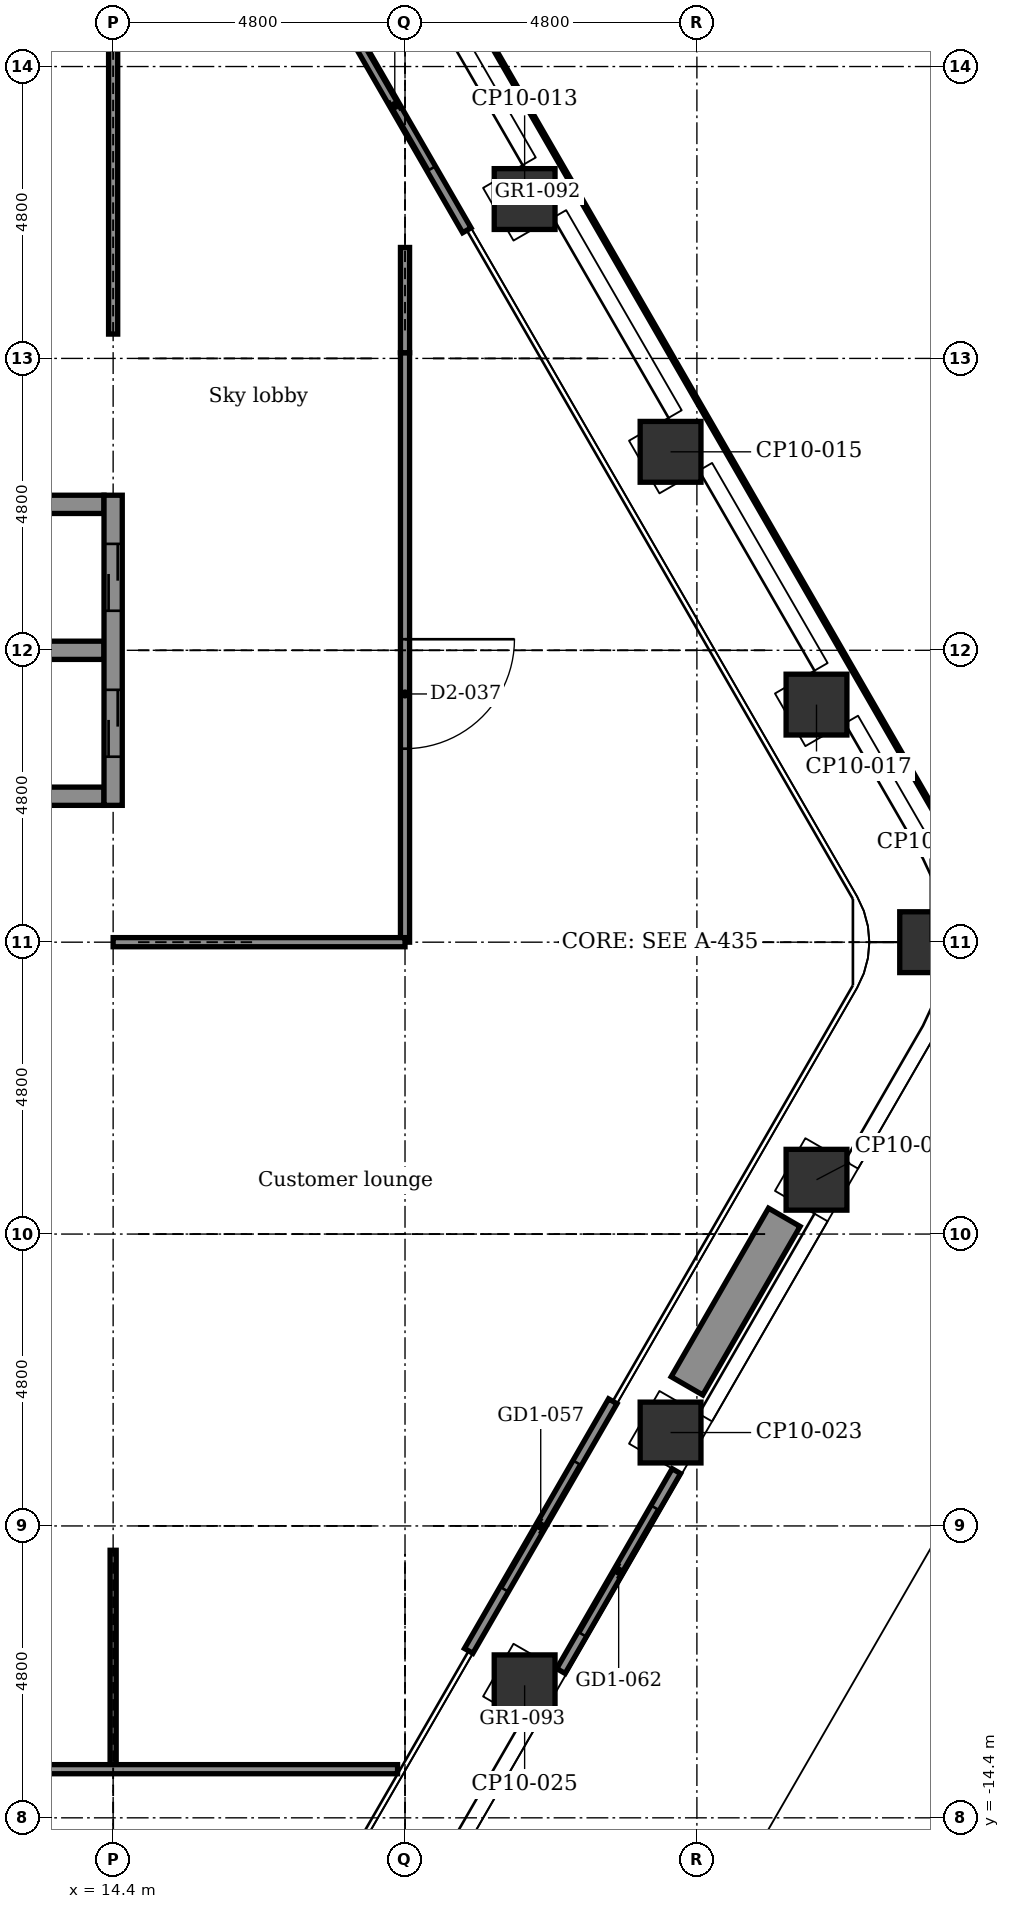
"""IFC4 building model, lengths in metres.
Left out: names, types, materials, properties, quantities, classifications, styles, units other than length and angle.
Written with IfcOpenShell. Run it as: python <this file> out.ifc"""

import sys

from ifc_helpers import new_model, si_unit, direction, frame, frame_2d, origin, origin_2d, place, context, subcontext, project, spatial, rectangle, extrude, element, fill, save


model = new_model("IFC4")
c1 = context("Model", 3, precision=1e-05, world=origin(), true_north=direction((0.0, 1.0)))
c2 = subcontext(c1, "Body", "Model", "MODEL_VIEW")
j1 = project(units=[si_unit("LENGTHUNIT", "METRE"), si_unit("PLANEANGLEUNIT", "RADIAN")], contexts=[c1])
p1 = place(None, origin())
s1 = spatial("IfcSite", under=j1, at=p1, CompositionType="ELEMENT")
p2 = place(p1, origin())
s2 = spatial("IfcBuilding", under=s1, at=p2, CompositionType="ELEMENT")
p3 = place(p2, frame((0.0, 0.0, 133.4)))
s3 = spatial("IfcBuildingStorey", under=s2, at=p3, CompositionType="ELEMENT", Elevation=133.4)
for number, where, z_axis, x_axis in (
    (1, (21.167, 12.221, -0.15), (0.0, 0.0, 1.0), (0.866, 0.5, 0.0)),
    (2, (23.567, 8.064, -0.15), (0.0, 0.0, 1.0), (0.866, 0.5, 0.0)),
    (3, (25.967, 3.907, -0.15), (0.0, 0.0, 1.0), (0.866, 0.5, 0.0)),
    (4, (27.836, 0.0, -0.15), (0.0, 0.0, 1.0), (1.0, 0.0, 0.0)),
    (5, (25.967, -3.907, -0.15), (0.0, 0.0, 1.0), (0.5, 0.866, 0.0)),
    (6, (23.567, -8.064, -0.15), (0.0, 0.0, 1.0), (0.5, 0.866, 0.0)),
    (7, (21.167, -12.221, -0.15), (0.0, 0.0, 1.0), (0.5, 0.866, 0.0)),
):
    element("IfcColumn", number, at=place(p3, frame(where, z_axis=z_axis, x_axis=x_axis)), inside=s3, PredefinedType="COLUMN", context=c2, shape_type="SweptSolid", body=[
        extrude(rectangle(XDim=1.0, YDim=1.0, at=origin_2d()), origin(), (0.0, 0.0, 1.0), 5.4),
    ])
for number, where, z_axis, x_axis in (
    (8, (9.95, 2.4, -0.15), (0.0, 0.0, 1.0), (1.0, 0.0, 0.0)),
    (9, (9.95, 4.8, -0.15), (0.0, 0.0, 1.0), (1.0, 0.0, 0.0)),
    (10, (9.95, 7.2, -0.15), (0.0, 0.0, 1.0), (1.0, 0.0, 0.0)),
):
    element("IfcWall", number, at=place(p3, frame(where, z_axis=z_axis, x_axis=x_axis)), inside=s3, PredefinedType="STANDARD", context=c2, shape_type="SweptSolid", body=[
        extrude(rectangle(XDim=4.3, YDim=0.3, at=frame_2d((2.15, 0.0))), origin(), (0.0, 0.0, 1.0), 4.55),
    ])
p4 = place(p3, frame((14.4, 2.25, -0.15), z_axis=(0.0, 0.0, 1.0), x_axis=(0.0, 1.0, 0.0)))
e11 = element("IfcWall", 11, at=p4, inside=s3, PredefinedType="STANDARD", context=c2, shape_type="SweptSolid", body=[
    extrude(rectangle(XDim=5.1, YDim=0.3, at=frame_2d((2.55, 0.0))), origin(), (0.0, 0.0, 1.0), 4.55),
])
p5 = place(p4, frame((0.8, 0.0, 0.15)))
e12 = element("IfcOpeningElement", 12, at=p5, cuts=e11, PredefinedType="OPENING", context=c2, shape_type="SweptSolid", body=[
    extrude(rectangle(XDim=1.1, YDim=2.1, at=frame_2d((0.55, 1.05))), frame((0.0, 0.16, 0.0), z_axis=(0.0, -1.0, 0.0), x_axis=(1.0, 0.0, 0.0)), (0.0, 0.0, 1.0), 0.32),
])
p6 = place(p4, frame((3.2, 0.0, 0.15)))
e13 = element("IfcOpeningElement", 13, at=p6, cuts=e11, PredefinedType="OPENING", context=c2, shape_type="SweptSolid", body=[
    extrude(rectangle(XDim=1.1, YDim=2.1, at=frame_2d((0.55, 1.05))), frame((0.0, 0.16, 0.0), z_axis=(0.0, -1.0, 0.0), x_axis=(1.0, 0.0, 0.0)), (0.0, 0.0, 1.0), 0.32),
])
p7 = place(p3, frame((17.847, 15.812, 0.0), z_axis=(0.0, 0.0, 1.0), x_axis=(0.5000167099, -0.866015756104, 0.0)))
e14 = element("IfcWall", 14, at=p7, inside=s3, PredefinedType="PARTITIONING", context=c2, shape_type="SweptSolid", body=[
    extrude(rectangle(XDim=4.74, YDim=0.16, at=frame_2d((2.37, 0.0))), origin(), (0.0, 0.0, 1.0), 5.25),
])
p8 = place(p7, frame((1.17, 0.0, 0.0)))
e15 = element("IfcOpeningElement", 15, at=p8, cuts=e14, PredefinedType="OPENING", context=c2, shape_type="SweptSolid", body=[
    extrude(rectangle(XDim=2.4, YDim=2.4, at=frame_2d((1.2, 1.2))), frame((0.0, 0.09, 0.0), z_axis=(0.0, -1.0, 0.0), x_axis=(1.0, 0.0, 0.0)), (0.0, 0.0, 1.0), 0.18),
])
p9 = place(p3, frame((22.617, -7.55, 0.0), z_axis=(0.0, 0.0, 1.0), x_axis=(-0.5000167099, -0.866015756104, 0.0)))
e16 = element("IfcWall", 16, at=p9, inside=s3, PredefinedType="PARTITIONING", context=c2, shape_type="SweptSolid", body=[
    extrude(rectangle(XDim=4.74, YDim=0.16, at=frame_2d((2.37, 0.0))), origin(), (0.0, 0.0, 1.0), 5.25),
])
p10 = place(p9, frame((1.17, 0.0, 0.0)))
e17 = element("IfcOpeningElement", 17, at=p10, cuts=e16, PredefinedType="OPENING", context=c2, shape_type="SweptSolid", body=[
    extrude(rectangle(XDim=2.4, YDim=2.4, at=frame_2d((1.2, 1.2))), frame((0.0, 0.09, 0.0), z_axis=(0.0, -1.0, 0.0), x_axis=(1.0, 0.0, 0.0)), (0.0, 0.0, 1.0), 0.18),
])
p11 = place(p3, frame((25.437, -4.525, 0.0), z_axis=(0.0, 0.0, 1.0), x_axis=(-0.499938187974, -0.866061088033, 0.0)))
e18 = element("IfcWall", 18, at=p11, inside=s3, PredefinedType="USERDEFINED", context=c2, shape_type="SweptSolid", body=[
    extrude(rectangle(XDim=3.2, YDim=0.6, at=frame_2d((1.6, 0.0))), origin(), (0.0, 0.0, 1.0), 0.7),
])
p12 = place(p3, frame((23.662, -8.698, 0.0), z_axis=(0.0, 0.0, 1.0), x_axis=(-0.499971120268, -0.866042076863, 0.0)))
e19 = element("IfcWall", 19, at=p12, inside=s3, PredefinedType="PARTITIONING", context=c2, shape_type="SweptSolid", body=[
    extrude(rectangle(XDim=3.796, YDim=0.16, at=frame_2d((1.898, 0.0))), origin(), (0.0, 0.0, 1.0), 4.25),
])
p13 = place(p12, frame((0.698, 0.0, 0.0)))
e20 = element("IfcOpeningElement", 20, at=p13, cuts=e19, PredefinedType="OPENING", context=c2, shape_type="SweptSolid", body=[
    extrude(rectangle(XDim=2.4, YDim=2.4, at=frame_2d((1.2, 1.2))), frame((0.0, 0.09, 0.0), z_axis=(0.0, -1.0, 0.0), x_axis=(1.0, 0.0, 0.0)), (0.0, 0.0, 1.0), 0.18),
])
p14 = place(p3, frame((19.2, 0.0, 0.0), z_axis=(0.0, 0.0, 1.0), x_axis=(0.0, 1.0, 0.0)))
e21 = element("IfcWall", 21, at=p14, inside=s3, PredefinedType="PARTITIONING", context=c2, shape_type="SweptSolid", body=[
    extrude(rectangle(XDim=9.694, YDim=0.15, at=frame_2d((4.847, 0.0))), origin(), (0.0, 0.0, 1.0), 5.25),
])
p15 = place(p14, frame((3.182, 0.0, 0.0)))
e22 = element("IfcOpeningElement", 22, at=p15, cuts=e21, PredefinedType="OPENING", context=c2, shape_type="SweptSolid", body=[
    extrude(rectangle(XDim=1.8, YDim=2.1, at=frame_2d((0.9, 1.05))), frame((0.0, 0.085, 0.0), z_axis=(0.0, -1.0, 0.0), x_axis=(1.0, 0.0, 0.0)), (0.0, 0.0, 1.0), 0.17),
])
p16 = place(p3, frame((19.2, 9.694, 0.0), z_axis=(0.0, 0.0, 1.0), x_axis=(0.0, 1.0, 0.0)))
e23 = element("IfcWall", 23, at=p16, inside=s3, PredefinedType="PARTITIONING", context=c2, shape_type="SweptSolid", body=[
    extrude(rectangle(XDim=1.731, YDim=0.15, at=frame_2d((0.865, 0.0))), origin(), (0.0, 0.0, 1.0), 4.94),
])
p17 = place(p3, frame((14.4, -13.6, 0.0), z_axis=(0.0, 0.0, 1.0), x_axis=(0.0, 1.0, 0.0)))
e24 = element("IfcWall", 24, at=p17, inside=s3, PredefinedType="PARTITIONING", context=c2, shape_type="SweptSolid", body=[
    extrude(rectangle(XDim=3.6, YDim=0.1, at=frame_2d((1.8, 0.0))), origin(), (0.0, 0.0, 1.0), 4.566),
])
p18 = place(p3, frame((14.4, 10.0, 0.0), z_axis=(0.0, 0.0, 1.0), x_axis=(0.0, 1.0, 0.0)))
e25 = element("IfcWall", 25, at=p18, inside=s3, PredefinedType="PARTITIONING", context=c2, shape_type="SweptSolid", body=[
    extrude(rectangle(XDim=4.8, YDim=0.15, at=frame_2d((2.4, 0.0))), origin(), (0.0, 0.0, 1.0), 4.566),
])
p19 = place(p3, frame((6.0, -13.6, 0.0), z_axis=(0.0, 0.0, 1.0), x_axis=(1.0, 0.0, 0.0)))
e26 = element("IfcWall", 26, at=p19, inside=s3, PredefinedType="PARTITIONING", context=c2, shape_type="SweptSolid", body=[
    extrude(rectangle(XDim=13.077, YDim=0.15, at=frame_2d((6.539, 0.0))), origin(), (0.0, 0.0, 1.0), 5.25),
])
p20 = place(p19, frame((3.75, 0.0, 0.0)))
e27 = element("IfcOpeningElement", 27, at=p20, cuts=e26, PredefinedType="OPENING", context=c2, shape_type="SweptSolid", body=[
    extrude(rectangle(XDim=0.9, YDim=2.1, at=frame_2d((0.45, 1.05))), frame((0.0, 0.085, 0.0), z_axis=(0.0, -1.0, 0.0), x_axis=(1.0, 0.0, 0.0)), (0.0, 0.0, 1.0), 0.17),
])
p21 = place(p3, frame((14.4, 0.0, 0.0), z_axis=(0.0, 0.0, 1.0), x_axis=(1.0, 0.0, 0.0)))
e28 = element("IfcWall", 28, at=p21, inside=s3, PredefinedType="PARTITIONING", context=c2, shape_type="SweptSolid", body=[
    extrude(rectangle(XDim=4.8, YDim=0.15, at=frame_2d((2.4, 0.0))), origin(), (0.0, 0.0, 1.0), 4.41),
])
p22 = place(p8, origin())
e29 = element("IfcDoor", 29, at=p22, inside=s3, OperationType="DOUBLE_DOOR_SLIDING", PredefinedType="DOOR", context=c2, shape_type="SweptSolid", body=[
    extrude(rectangle(XDim=2.4, YDim=2.4, at=frame_2d((1.2, 1.2))), frame((0.0, 0.025, 0.0), z_axis=(0.0, -1.0, 0.0), x_axis=(1.0, 0.0, 0.0)), (0.0, 0.0, 1.0), 0.05),
])
fill(e15, e29)
p23 = place(p10, origin())
e30 = element("IfcDoor", 30, at=p23, inside=s3, OperationType="DOUBLE_DOOR_SLIDING", PredefinedType="DOOR", context=c2, shape_type="SweptSolid", body=[
    extrude(rectangle(XDim=2.4, YDim=2.4, at=frame_2d((1.2, 1.2))), frame((0.0, 0.025, 0.0), z_axis=(0.0, -1.0, 0.0), x_axis=(1.0, 0.0, 0.0)), (0.0, 0.0, 1.0), 0.05),
])
fill(e17, e30)
p24 = place(p13, origin())
e31 = element("IfcDoor", 31, at=p24, inside=s3, OperationType="DOUBLE_DOOR_SLIDING", PredefinedType="DOOR", context=c2, shape_type="SweptSolid", body=[
    extrude(rectangle(XDim=2.4, YDim=2.4, at=frame_2d((1.2, 1.2))), frame((0.0, 0.025, 0.0), z_axis=(0.0, -1.0, 0.0), x_axis=(1.0, 0.0, 0.0)), (0.0, 0.0, 1.0), 0.05),
])
fill(e20, e31)
p25 = place(p15, frame((1.8, 0.0, 0.0), z_axis=(0.0, 0.0, 1.0), x_axis=(-1.0, 0.0, 0.0)))
e32 = element("IfcDoor", 32, at=p25, inside=s3, OperationType="SINGLE_SWING_RIGHT", PredefinedType="DOOR", context=c2, shape_type="SweptSolid", body=[
    extrude(rectangle(XDim=1.8, YDim=2.1, at=frame_2d((0.9, 1.05))), frame((0.0, 0.025, 0.0), z_axis=(0.0, -1.0, 0.0), x_axis=(1.0, 0.0, 0.0)), (0.0, 0.0, 1.0), 0.05),
])
fill(e22, e32)
p26 = place(p5, origin())
e33 = element("IfcDoor", 33, at=p26, inside=s3, OperationType="DOUBLE_DOOR_SLIDING", PredefinedType="DOOR", context=c2, shape_type="SweptSolid", body=[
    extrude(rectangle(XDim=1.1, YDim=2.1, at=frame_2d((0.55, 1.05))), frame((0.0, 0.025, 0.0), z_axis=(0.0, -1.0, 0.0), x_axis=(1.0, 0.0, 0.0)), (0.0, 0.0, 1.0), 0.05),
])
fill(e12, e33)
p27 = place(p6, origin())
e34 = element("IfcDoor", 34, at=p27, inside=s3, OperationType="DOUBLE_DOOR_SLIDING", PredefinedType="DOOR", context=c2, shape_type="SweptSolid", body=[
    extrude(rectangle(XDim=1.1, YDim=2.1, at=frame_2d((0.55, 1.05))), frame((0.0, 0.025, 0.0), z_axis=(0.0, -1.0, 0.0), x_axis=(1.0, 0.0, 0.0)), (0.0, 0.0, 1.0), 0.05),
])
fill(e13, e34)
save(model, sys.argv[1])
